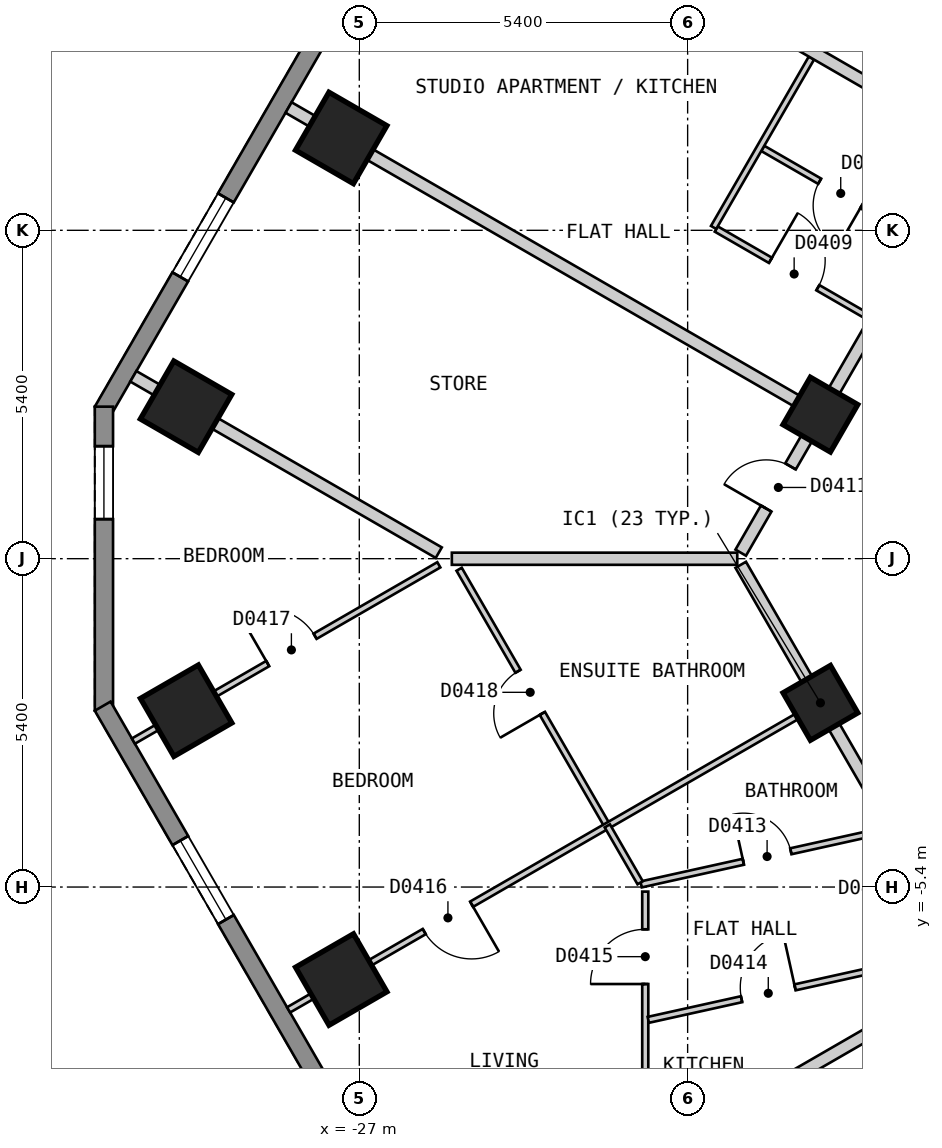
"""IFC4 building model, lengths in metres.
Left out: names, types, materials, properties, quantities, classifications, styles, units other than length and angle.
Written with IfcOpenShell. Run it as: python <this file> out.ifc"""

import sys

from ifc_helpers import new_model, si_unit, direction, frame, frame_2d, origin, origin_2d, place, context, subcontext, project, spatial, polyline, rectangle, outline, extrude, element, fill, save


model = new_model("IFC4")
c1 = context("Model", 3, precision=1e-05, world=origin(), true_north=direction((0.0, 1.0)))
c2 = subcontext(c1, "Body", "Model", "MODEL_VIEW")
j1 = project(units=[si_unit("LENGTHUNIT", "METRE"), si_unit("PLANEANGLEUNIT", "RADIAN")], contexts=[c1])
p1 = place(None, origin())
s1 = spatial("IfcSite", under=j1, at=p1, CompositionType="ELEMENT")
p2 = place(p1, origin())
s2 = spatial("IfcBuilding", under=s1, at=p2, CompositionType="ELEMENT")
p3 = place(p2, frame((0.0, 0.0, 38.4)))
s3 = spatial("IfcBuildingStorey", under=s2, at=p3, CompositionType="ELEMENT", Elevation=38.4)
for number, where, z_axis, x_axis in (
    (1, (-27.298, 6.919, 0.0), (0.0, 0.0, 1.0), (-0.5, -0.866, 0.0)),
    (2, (-29.849, 2.499, 0.0), (0.0, 0.0, 1.0), (-0.5, -0.866, 0.0)),
    (3, (-29.848, -2.5, 0.0), (0.0, 0.0, 1.0), (0.5, -0.866, 0.0)),
    (4, (-27.297, -6.921, 0.0), (0.0, 0.0, 1.0), (0.5, -0.866, 0.0)),
):
    element("IfcColumn", number, at=place(p3, frame(where, z_axis=z_axis, x_axis=x_axis)), inside=s3, PredefinedType="COLUMN", context=c2, shape_type="SweptSolid", body=[
        extrude(rectangle(XDim=1.1, YDim=1.1, at=origin_2d()), origin(), (0.0, 0.0, 1.0), 3.0),
    ])
for number, where, z_axis, x_axis in (
    (5, (-19.416, -2.371, 0.0), (0.0, 0.0, 1.0), (0.5, -0.866, 0.0)),
    (6, (-19.417, 2.369, 0.0), (0.0, 0.0, 1.0), (-0.5, -0.866, 0.0)),
):
    element("IfcColumn", number, at=place(p3, frame(where, z_axis=z_axis, x_axis=x_axis)), inside=s3, PredefinedType="COLUMN", context=c2, shape_type="SweptSolid", body=[
        extrude(rectangle(XDim=0.9, YDim=0.9, at=origin_2d()), origin(), (0.0, 0.0, 1.0), 3.0),
    ])
p4 = place(p3, frame((-17.71, 25.825, 0.0), z_axis=(0.0, 0.0, 1.0), x_axis=(-0.500001938803, -0.866024284413, 0.0)))
e7 = element("IfcWall", 7, at=p4, inside=s3, PredefinedType="SOLIDWALL", context=c2, shape_type="SweptSolid", body=[
    extrude(outline(polyline([(0.0, -0.15), (27.02, -0.15), (26.94, 0.15), (0.08, 0.15), (0.0, -0.15)])), origin(), (0.0, 0.0, 1.0), 2.7),
])
p5 = place(p4, frame((2.553, 0.0, 0.15)))
e8 = element("IfcOpeningElement", 8, at=p5, cuts=e7, PredefinedType="OPENING", context=c2, shape_type="SweptSolid", body=[
    extrude(rectangle(XDim=1.5, YDim=2.1, at=frame_2d((0.75, 1.05))), frame((0.0, 0.16, 0.0), z_axis=(0.0, -1.0, 0.0), x_axis=(1.0, 0.0, 0.0)), (0.0, 0.0, 1.0), 0.32),
])
p6 = place(p4, frame((7.658, 0.0, 0.15)))
e9 = element("IfcOpeningElement", 9, at=p6, cuts=e7, PredefinedType="OPENING", context=c2, shape_type="SweptSolid", body=[
    extrude(rectangle(XDim=1.5, YDim=2.1, at=frame_2d((0.75, 1.05))), frame((0.0, 0.16, 0.0), z_axis=(0.0, -1.0, 0.0), x_axis=(1.0, 0.0, 0.0)), (0.0, 0.0, 1.0), 0.32),
])
p7 = place(p4, frame((12.761, 0.0, 0.15)))
e10 = element("IfcOpeningElement", 10, at=p7, cuts=e7, PredefinedType="OPENING", context=c2, shape_type="SweptSolid", body=[
    extrude(rectangle(XDim=1.5, YDim=2.1, at=frame_2d((0.75, 1.05))), frame((0.0, 0.16, 0.0), z_axis=(0.0, -1.0, 0.0), x_axis=(1.0, 0.0, 0.0)), (0.0, 0.0, 1.0), 0.32),
])
p8 = place(p4, frame((17.865, 0.0, 0.15)))
e11 = element("IfcOpeningElement", 11, at=p8, cuts=e7, PredefinedType="OPENING", context=c2, shape_type="SweptSolid", body=[
    extrude(rectangle(XDim=1.5, YDim=2.1, at=frame_2d((0.75, 1.05))), frame((0.0, 0.16, 0.0), z_axis=(0.0, -1.0, 0.0), x_axis=(1.0, 0.0, 0.0)), (0.0, 0.0, 1.0), 0.32),
])
p9 = place(p4, frame((22.969, 0.0, 0.15)))
e12 = element("IfcOpeningElement", 12, at=p9, cuts=e7, PredefinedType="OPENING", context=c2, shape_type="SweptSolid", body=[
    extrude(rectangle(XDim=1.5, YDim=2.1, at=frame_2d((0.75, 1.05))), frame((0.0, 0.16, 0.0), z_axis=(0.0, -1.0, 0.0), x_axis=(1.0, 0.0, 0.0)), (0.0, 0.0, 1.0), 0.32),
])
p10 = place(p3, frame((-31.2, 2.5, 0.0), z_axis=(0.0, 0.0, 1.0), x_axis=(0.0, -1.0, 0.0)))
e13 = element("IfcWall", 13, at=p10, inside=s3, PredefinedType="SOLIDWALL", context=c2, shape_type="SweptSolid", body=[
    extrude(outline(polyline([(0.0, -0.15), (5.0, -0.15), (4.92, 0.15), (0.08, 0.15), (0.0, -0.15)])), origin(), (0.0, 0.0, 1.0), 2.7),
])
p11 = place(p10, frame((0.65, 0.0, 0.15)))
e14 = element("IfcOpeningElement", 14, at=p11, cuts=e13, PredefinedType="OPENING", context=c2, shape_type="SweptSolid", body=[
    extrude(rectangle(XDim=1.2, YDim=2.1, at=frame_2d((0.6, 1.05))), frame((0.0, 0.16, 0.0), z_axis=(0.0, -1.0, 0.0), x_axis=(1.0, 0.0, 0.0)), (0.0, 0.0, 1.0), 0.32),
])
p12 = place(p3, frame((-31.22, -2.425, 0.0), z_axis=(0.0, 0.0, 1.0), x_axis=(0.500001938803, -0.866024284413, 0.0)))
e15 = element("IfcWall", 15, at=p12, inside=s3, PredefinedType="SOLIDWALL", context=c2, shape_type="SweptSolid", body=[
    extrude(outline(polyline([(0.0, -0.15), (27.02, -0.15), (26.94, 0.15), (0.08, 0.15), (0.0, -0.15)])), origin(), (0.0, 0.0, 1.0), 2.7),
])
p13 = place(p12, frame((2.553, 0.0, 0.15)))
e16 = element("IfcOpeningElement", 16, at=p13, cuts=e15, PredefinedType="OPENING", context=c2, shape_type="SweptSolid", body=[
    extrude(rectangle(XDim=1.5, YDim=2.1, at=frame_2d((0.75, 1.05))), frame((0.0, 0.16, 0.0), z_axis=(0.0, -1.0, 0.0), x_axis=(1.0, 0.0, 0.0)), (0.0, 0.0, 1.0), 0.32),
])
p14 = place(p12, frame((7.657, 0.0, 0.15)))
e17 = element("IfcOpeningElement", 17, at=p14, cuts=e15, PredefinedType="OPENING", context=c2, shape_type="SweptSolid", body=[
    extrude(rectangle(XDim=1.5, YDim=2.1, at=frame_2d((0.75, 1.05))), frame((0.0, 0.16, 0.0), z_axis=(0.0, -1.0, 0.0), x_axis=(1.0, 0.0, 0.0)), (0.0, 0.0, 1.0), 0.32),
])
p15 = place(p12, frame((12.761, 0.0, 0.15)))
e18 = element("IfcOpeningElement", 18, at=p15, cuts=e15, PredefinedType="OPENING", context=c2, shape_type="SweptSolid", body=[
    extrude(rectangle(XDim=1.5, YDim=2.1, at=frame_2d((0.75, 1.05))), frame((0.0, 0.16, 0.0), z_axis=(0.0, -1.0, 0.0), x_axis=(1.0, 0.0, 0.0)), (0.0, 0.0, 1.0), 0.32),
])
p16 = place(p12, frame((17.865, 0.0, 0.15)))
e19 = element("IfcOpeningElement", 19, at=p16, cuts=e15, PredefinedType="OPENING", context=c2, shape_type="SweptSolid", body=[
    extrude(rectangle(XDim=1.5, YDim=2.1, at=frame_2d((0.75, 1.05))), frame((0.0, 0.16, 0.0), z_axis=(0.0, -1.0, 0.0), x_axis=(1.0, 0.0, 0.0)), (0.0, 0.0, 1.0), 0.32),
])
p17 = place(p12, frame((22.969, 0.0, 0.15)))
e20 = element("IfcOpeningElement", 20, at=p17, cuts=e15, PredefinedType="OPENING", context=c2, shape_type="SweptSolid", body=[
    extrude(rectangle(XDim=1.5, YDim=2.1, at=frame_2d((0.75, 1.05))), frame((0.0, 0.16, 0.0), z_axis=(0.0, -1.0, 0.0), x_axis=(1.0, 0.0, 0.0)), (0.0, 0.0, 1.0), 0.32),
])
p18 = place(p3, frame((-20.727, -0.101, 0.0), z_axis=(0.0, 0.0, 1.0), x_axis=(0.500049702773, -0.865996705973, 0.0)))
e21 = element("IfcWall", 21, at=p18, inside=s3, PredefinedType="PARTITIONING", context=c2, shape_type="SweptSolid", body=[
    extrude(rectangle(XDim=7.211, YDim=0.2, at=frame_2d((3.605, 0.0))), origin(), (0.0, 0.0, 1.0), 2.7),
])
p19 = place(p18, frame((5.654, 0.0, 0.0)))
e22 = element("IfcOpeningElement", 22, at=p19, cuts=e21, PredefinedType="OPENING", context=c2, shape_type="SweptSolid", body=[
    extrude(rectangle(XDim=1.0, YDim=2.1, at=frame_2d((0.5, 1.05))), frame((0.0, 0.11, 0.0), z_axis=(0.0, -1.0, 0.0), x_axis=(1.0, 0.0, 0.0)), (0.0, 0.0, 1.0), 0.22),
])
p20 = place(p3, frame((-20.727, 0.099, 0.0), z_axis=(0.0, 0.0, 1.0), x_axis=(0.499993204491, 0.866029327138, 0.0)))
e23 = element("IfcWall", 23, at=p20, inside=s3, PredefinedType="PARTITIONING", context=c2, shape_type="SweptSolid", body=[
    extrude(rectangle(XDim=20.554, YDim=0.2, at=frame_2d((10.277, 0.0))), origin(), (0.0, 0.0, 1.0), 2.7),
])
p21 = place(p20, frame((18.916, 0.0, 0.0)))
e24 = element("IfcOpeningElement", 24, at=p21, cuts=e23, PredefinedType="OPENING", context=c2, shape_type="SweptSolid", body=[
    extrude(rectangle(XDim=0.8, YDim=2.1, at=frame_2d((0.4, 1.05))), frame((0.0, 0.11, 0.0), z_axis=(0.0, -1.0, 0.0), x_axis=(1.0, 0.0, 0.0)), (0.0, 0.0, 1.0), 0.22),
])
p22 = place(p20, frame((14.88, 0.0, 0.0)))
e25 = element("IfcOpeningElement", 25, at=p22, cuts=e23, PredefinedType="OPENING", context=c2, shape_type="SweptSolid", body=[
    extrude(rectangle(XDim=1.0, YDim=2.1, at=frame_2d((0.5, 1.05))), frame((0.0, 0.11, 0.0), z_axis=(0.0, -1.0, 0.0), x_axis=(1.0, 0.0, 0.0)), (0.0, 0.0, 1.0), 0.22),
])
p23 = place(p20, frame((9.776, 0.0, 0.0)))
e26 = element("IfcOpeningElement", 26, at=p23, cuts=e23, PredefinedType="OPENING", context=c2, shape_type="SweptSolid", body=[
    extrude(rectangle(XDim=1.0, YDim=2.1, at=frame_2d((0.5, 1.05))), frame((0.0, 0.11, 0.0), z_axis=(0.0, -1.0, 0.0), x_axis=(1.0, 0.0, 0.0)), (0.0, 0.0, 1.0), 0.22),
])
p24 = place(p20, frame((4.673, 0.0, 0.0)))
e27 = element("IfcOpeningElement", 27, at=p24, cuts=e23, PredefinedType="OPENING", context=c2, shape_type="SweptSolid", body=[
    extrude(rectangle(XDim=1.0, YDim=2.1, at=frame_2d((0.5, 1.05))), frame((0.0, 0.11, 0.0), z_axis=(0.0, -1.0, 0.0), x_axis=(1.0, 0.0, 0.0)), (0.0, 0.0, 1.0), 0.22),
])
p25 = place(p20, frame((0.838, 0.0, 0.0)))
e28 = element("IfcOpeningElement", 28, at=p25, cuts=e23, PredefinedType="OPENING", context=c2, shape_type="SweptSolid", body=[
    extrude(rectangle(XDim=0.8, YDim=2.1, at=frame_2d((0.4, 1.05))), frame((0.0, 0.11, 0.0), z_axis=(0.0, -1.0, 0.0), x_axis=(1.0, 0.0, 0.0)), (0.0, 0.0, 1.0), 0.22),
])
p26 = place(p3, frame((-25.358, -0.174, 0.0), z_axis=(0.0, 0.0, 1.0), x_axis=(0.500093956194, -0.865971151354, 0.0)))
e29 = element("IfcWall", 29, at=p26, inside=s3, PredefinedType="PARTITIONING", context=c2, shape_type="SweptSolid", body=[
    extrude(rectangle(XDim=4.873, YDim=0.1, at=frame_2d((2.437, 0.0))), origin(), (0.0, 0.0, 1.0), 2.7),
])
p27 = place(p26, frame((1.937, 0.0, 0.0)))
e30 = element("IfcOpeningElement", 30, at=p27, cuts=e29, PredefinedType="OPENING", context=c2, shape_type="SweptSolid", body=[
    extrude(rectangle(XDim=0.8, YDim=2.1, at=frame_2d((0.4, 1.05))), frame((0.0, 0.06, 0.0), z_axis=(0.0, -1.0, 0.0), x_axis=(1.0, 0.0, 0.0)), (0.0, 0.0, 1.0), 0.12),
])
p28 = place(p3, frame((-20.364, 6.747, 0.0), z_axis=(0.0, 0.0, 1.0), x_axis=(0.866003949776, -0.500037157592, 0.0)))
e31 = element("IfcWall", 31, at=p28, inside=s3, PredefinedType="PARTITIONING", context=c2, shape_type="SweptSolid", body=[
    extrude(rectangle(XDim=2.91, YDim=0.1, at=frame_2d((1.455, 0.0))), origin(), (0.0, 0.0, 1.0), 2.7),
])
p29 = place(p28, frame((1.08, 0.0, 0.0)))
e32 = element("IfcOpeningElement", 32, at=p29, cuts=e31, PredefinedType="OPENING", context=c2, shape_type="SweptSolid", body=[
    extrude(rectangle(XDim=0.8, YDim=2.1, at=frame_2d((0.4, 1.05))), frame((0.0, 0.06, 0.0), z_axis=(0.0, -1.0, 0.0), x_axis=(1.0, 0.0, 0.0)), (0.0, 0.0, 1.0), 0.12),
])
p30 = place(p3, frame((-21.129, 5.421, 0.0), z_axis=(0.0, 0.0, 1.0), x_axis=(0.865935355752, -0.500155935342, 0.0)))
e33 = element("IfcWall", 33, at=p30, inside=s3, PredefinedType="PARTITIONING", context=c2, shape_type="SweptSolid", body=[
    extrude(rectangle(XDim=2.909, YDim=0.1, at=frame_2d((1.454, 0.0))), origin(), (0.0, 0.0, 1.0), 2.7),
])
p31 = place(p30, frame((1.029, 0.0, 0.0)))
e34 = element("IfcOpeningElement", 34, at=p31, cuts=e33, PredefinedType="OPENING", context=c2, shape_type="SweptSolid", body=[
    extrude(rectangle(XDim=0.9, YDim=2.1, at=frame_2d((0.45, 1.05))), frame((0.0, 0.06, 0.0), z_axis=(0.0, -1.0, 0.0), x_axis=(1.0, 0.0, 0.0)), (0.0, 0.0, 1.0), 0.12),
])
p32 = place(p3, frame((-21.173, 5.447, 0.0), z_axis=(0.0, 0.0, 1.0), x_axis=(0.500162542782, 0.865931539325, 0.0)))
e35 = element("IfcWall", 35, at=p32, inside=s3, PredefinedType="PARTITIONING", context=c2, shape_type="SweptSolid", body=[
    extrude(rectangle(XDim=3.217, YDim=0.1, at=frame_2d((1.609, 0.0))), origin(), (0.0, 0.0, 1.0), 2.7),
])
p33 = place(p3, frame((-22.297, -9.813, 0.0), z_axis=(0.0, 0.0, 1.0), x_axis=(0.0, 1.0, 0.0)))
e36 = element("IfcWall", 36, at=p33, inside=s3, PredefinedType="PARTITIONING", context=c2, shape_type="SweptSolid", body=[
    extrude(rectangle(XDim=4.338, YDim=0.1, at=frame_2d((2.169, 0.0))), origin(), (0.0, 0.0, 1.0), 2.7),
])
p34 = place(p33, frame((2.818, 0.0, 0.0)))
e37 = element("IfcOpeningElement", 37, at=p34, cuts=e36, PredefinedType="OPENING", context=c2, shape_type="SweptSolid", body=[
    extrude(rectangle(XDim=0.9, YDim=2.1, at=frame_2d((0.45, 1.05))), frame((0.0, 0.06, 0.0), z_axis=(0.0, -1.0, 0.0), x_axis=(1.0, 0.0, 0.0)), (0.0, 0.0, 1.0), 0.12),
])
p35 = place(p3, frame((-22.365, -5.357, 0.0), z_axis=(0.0, 0.0, 1.0), x_axis=(0.976339488582, 0.216243388421, 0.0)))
e38 = element("IfcWall", 38, at=p35, inside=s3, PredefinedType="PARTITIONING", context=c2, shape_type="SweptSolid", body=[
    extrude(rectangle(XDim=4.139, YDim=0.1, at=frame_2d((2.069, 0.0))), origin(), (0.0, 0.0, 1.0), 2.7),
])
p36 = place(p35, frame((1.722, 0.0, 0.0)))
e39 = element("IfcOpeningElement", 39, at=p36, cuts=e38, PredefinedType="OPENING", context=c2, shape_type="SweptSolid", body=[
    extrude(rectangle(XDim=0.8, YDim=2.1, at=frame_2d((0.4, 1.05))), frame((0.0, 0.06, 0.0), z_axis=(0.0, -1.0, 0.0), x_axis=(1.0, 0.0, 0.0)), (0.0, 0.0, 1.0), 0.12),
])
p37 = place(p3, frame((-22.247, -7.584, 0.0), z_axis=(0.0, 0.0, 1.0), x_axis=(0.97635375062, 0.216178985219, 0.0)))
e40 = element("IfcWall", 40, at=p37, inside=s3, PredefinedType="PARTITIONING", context=c2, shape_type="SweptSolid", body=[
    extrude(rectangle(XDim=4.094, YDim=0.1, at=frame_2d((2.047, 0.0))), origin(), (0.0, 0.0, 1.0), 2.7),
])
p38 = place(p37, frame((1.571, 0.0, 0.0)))
e41 = element("IfcOpeningElement", 41, at=p38, cuts=e40, PredefinedType="OPENING", context=c2, shape_type="SweptSolid", body=[
    extrude(rectangle(XDim=0.9, YDim=2.1, at=frame_2d((0.45, 1.05))), frame((0.0, 0.06, 0.0), z_axis=(0.0, -1.0, 0.0), x_axis=(1.0, 0.0, 0.0)), (0.0, 0.0, 1.0), 0.12),
])
p39 = place(p3, frame((-28.163, -7.42, 0.0), z_axis=(0.0, 0.0, 1.0), x_axis=(0.866065245018, 0.499930986609, 0.0)))
e42 = element("IfcWall", 42, at=p39, inside=s3, PredefinedType="PARTITIONING", context=c2, shape_type="SweptSolid", body=[
    extrude(rectangle(XDim=10.0, YDim=0.1, at=frame_2d((5.0, 0.0))), origin(), (0.0, 0.0, 1.0), 2.7),
])
p40 = place(p39, frame((2.576, 0.0, 0.0)))
e43 = element("IfcOpeningElement", 43, at=p40, cuts=e42, PredefinedType="OPENING", context=c2, shape_type="SweptSolid", body=[
    extrude(rectangle(XDim=0.9, YDim=2.1, at=frame_2d((0.45, 1.05))), frame((0.0, 0.06, 0.0), z_axis=(0.0, -1.0, 0.0), x_axis=(1.0, 0.0, 0.0)), (0.0, 0.0, 1.0), 0.12),
])
p41 = place(p3, frame((-30.715, -3.0, 0.0), z_axis=(0.0, 0.0, 1.0), x_axis=(0.866116197112, 0.49984270836, 0.0)))
e44 = element("IfcWall", 44, at=p41, inside=s3, PredefinedType="PARTITIONING", context=c2, shape_type="SweptSolid", body=[
    extrude(rectangle(XDim=5.8, YDim=0.1, at=frame_2d((2.9, 0.0))), origin(), (0.0, 0.0, 1.0), 2.7),
])
p42 = place(p41, frame((2.55, 0.0, 0.0)))
e45 = element("IfcOpeningElement", 45, at=p42, cuts=e44, PredefinedType="OPENING", context=c2, shape_type="SweptSolid", body=[
    extrude(rectangle(XDim=0.9, YDim=2.1, at=frame_2d((0.45, 1.05))), frame((0.0, 0.06, 0.0), z_axis=(0.0, -1.0, 0.0), x_axis=(1.0, 0.0, 0.0)), (0.0, 0.0, 1.0), 0.12),
])
p43 = place(p3, frame((-28.163, 7.419, 0.0), z_axis=(0.0, 0.0, 1.0), x_axis=(0.866022959057, -0.500004234368, 0.0)))
e46 = element("IfcWall", 46, at=p43, inside=s3, PredefinedType="PARTITIONING", context=c2, shape_type="SweptSolid", body=[
    extrude(rectangle(XDim=10.0, YDim=0.2, at=frame_2d((5.0, 0.0))), origin(), (0.0, 0.0, 1.0), 2.7),
])
p44 = place(p3, frame((-30.716, 2.999, 0.0), z_axis=(0.0, 0.0, 1.0), x_axis=(0.866032775405, -0.499987231761, 0.0)))
e47 = element("IfcWall", 47, at=p44, inside=s3, PredefinedType="PARTITIONING", context=c2, shape_type="SweptSolid", body=[
    extrude(rectangle(XDim=5.8, YDim=0.2, at=frame_2d((2.9, 0.0))), origin(), (0.0, 0.0, 1.0), 2.7),
])
p45 = place(p3, frame((-25.611, 11.839, 0.0), z_axis=(0.0, 0.0, 1.0), x_axis=(0.866022959057, -0.500004234368, 0.0)))
e48 = element("IfcWall", 48, at=p45, inside=s3, PredefinedType="PARTITIONING", context=c2, shape_type="SweptSolid", body=[
    extrude(rectangle(XDim=10.0, YDim=0.2, at=frame_2d((5.0, 0.0))), origin(), (0.0, 0.0, 1.0), 2.7),
])
p46 = place(p3, frame((-25.478, -0.001, 0.0), z_axis=(0.0, 0.0, 1.0), x_axis=(1.0, 0.0, 0.0)))
e49 = element("IfcWall", 49, at=p46, inside=s3, PredefinedType="PARTITIONING", context=c2, shape_type="SweptSolid", body=[
    extrude(rectangle(XDim=4.694, YDim=0.2, at=frame_2d((2.347, 0.0))), origin(), (0.0, 0.0, 1.0), 2.7),
])
p47 = place(p3, frame((-25.61, -11.841, 0.0), z_axis=(0.0, 0.0, 1.0), x_axis=(0.866019023803, 0.500011050288, 0.0)))
e50 = element("IfcWall", 50, at=p47, inside=s3, PredefinedType="PARTITIONING", context=c2, shape_type="SweptSolid", body=[
    extrude(rectangle(XDim=8.47, YDim=0.2, at=frame_2d((4.235, 0.0))), origin(), (0.0, 0.0, 1.0), 2.7),
])
p48 = place(p3, frame((-22.921, -4.394, 0.0), z_axis=(0.0, 0.0, 1.0), x_axis=(0.499565963512, -0.866275849889, 0.0)))
e51 = element("IfcWall", 51, at=p48, inside=s3, PredefinedType="PARTITIONING", context=c2, shape_type="SweptSolid", body=[
    extrude(rectangle(XDim=1.081, YDim=0.1, at=frame_2d((0.54, 0.0))), origin(), (0.0, 0.0, 1.0), 2.7),
])
p49 = place(p9, origin())
e52 = element("IfcWindow", 52, at=p49, inside=s3, PartitioningType="SINGLE_PANEL", PredefinedType="WINDOW", context=c2, shape_type="SweptSolid", body=[
    extrude(rectangle(XDim=1.5, YDim=2.1, at=frame_2d((0.75, 1.05))), frame((0.0, 0.03, 0.0), z_axis=(0.0, -1.0, 0.0), x_axis=(1.0, 0.0, 0.0)), (0.0, 0.0, 1.0), 0.06),
])
fill(e12, e52)
p50 = place(p11, origin())
e53 = element("IfcWindow", 53, at=p50, inside=s3, PartitioningType="SINGLE_PANEL", PredefinedType="WINDOW", context=c2, shape_type="SweptSolid", body=[
    extrude(rectangle(XDim=1.2, YDim=2.1, at=frame_2d((0.6, 1.05))), frame((0.0, 0.03, 0.0), z_axis=(0.0, -1.0, 0.0), x_axis=(1.0, 0.0, 0.0)), (0.0, 0.0, 1.0), 0.06),
])
fill(e14, e53)
p51 = place(p13, origin())
e54 = element("IfcWindow", 54, at=p51, inside=s3, PartitioningType="SINGLE_PANEL", PredefinedType="WINDOW", context=c2, shape_type="SweptSolid", body=[
    extrude(rectangle(XDim=1.5, YDim=2.1, at=frame_2d((0.75, 1.05))), frame((0.0, 0.03, 0.0), z_axis=(0.0, -1.0, 0.0), x_axis=(1.0, 0.0, 0.0)), (0.0, 0.0, 1.0), 0.06),
])
fill(e16, e54)
p52 = place(p31, origin())
e55 = element("IfcDoor", 55, at=p52, inside=s3, OperationType="SINGLE_SWING_LEFT", PredefinedType="DOOR", context=c2, shape_type="SweptSolid", body=[
    extrude(rectangle(XDim=0.9, YDim=2.1, at=frame_2d((0.45, 1.05))), frame((0.0, 0.025, 0.0), z_axis=(0.0, -1.0, 0.0), x_axis=(1.0, 0.0, 0.0)), (0.0, 0.0, 1.0), 0.05),
])
fill(e34, e55)
p53 = place(p29, origin())
e56 = element("IfcDoor", 56, at=p53, inside=s3, OperationType="SINGLE_SWING_RIGHT", PredefinedType="DOOR", context=c2, shape_type="SweptSolid", body=[
    extrude(rectangle(XDim=0.8, YDim=2.1, at=frame_2d((0.4, 1.05))), frame((0.0, 0.025, 0.0), z_axis=(0.0, -1.0, 0.0), x_axis=(1.0, 0.0, 0.0)), (0.0, 0.0, 1.0), 0.05),
])
fill(e32, e56)
p54 = place(p25, origin())
e57 = element("IfcDoor", 57, at=p54, inside=s3, OperationType="SINGLE_SWING_LEFT", PredefinedType="DOOR", context=c2, shape_type="SweptSolid", body=[
    extrude(rectangle(XDim=0.8, YDim=2.1, at=frame_2d((0.4, 1.05))), frame((0.0, 0.025, 0.0), z_axis=(0.0, -1.0, 0.0), x_axis=(1.0, 0.0, 0.0)), (0.0, 0.0, 1.0), 0.05),
])
fill(e28, e57)
p55 = place(p36, origin())
e58 = element("IfcDoor", 58, at=p55, inside=s3, OperationType="SINGLE_SWING_LEFT", PredefinedType="DOOR", context=c2, shape_type="SweptSolid", body=[
    extrude(rectangle(XDim=0.8, YDim=2.1, at=frame_2d((0.4, 1.05))), frame((0.0, 0.025, 0.0), z_axis=(0.0, -1.0, 0.0), x_axis=(1.0, 0.0, 0.0)), (0.0, 0.0, 1.0), 0.05),
])
fill(e39, e58)
p56 = place(p38, origin())
e59 = element("IfcDoor", 59, at=p56, inside=s3, OperationType="SINGLE_SWING_RIGHT", PredefinedType="DOOR", context=c2, shape_type="SweptSolid", body=[
    extrude(rectangle(XDim=0.9, YDim=2.1, at=frame_2d((0.45, 1.05))), frame((0.0, 0.025, 0.0), z_axis=(0.0, -1.0, 0.0), x_axis=(1.0, 0.0, 0.0)), (0.0, 0.0, 1.0), 0.05),
])
fill(e41, e59)
p57 = place(p34, origin())
e60 = element("IfcDoor", 60, at=p57, inside=s3, OperationType="SINGLE_SWING_LEFT", PredefinedType="DOOR", context=c2, shape_type="SweptSolid", body=[
    extrude(rectangle(XDim=0.9, YDim=2.1, at=frame_2d((0.45, 1.05))), frame((0.0, 0.025, 0.0), z_axis=(0.0, -1.0, 0.0), x_axis=(1.0, 0.0, 0.0)), (0.0, 0.0, 1.0), 0.05),
])
fill(e37, e60)
p58 = place(p40, origin())
e61 = element("IfcDoor", 61, at=p58, inside=s3, OperationType="SINGLE_SWING_RIGHT", PredefinedType="DOOR", context=c2, shape_type="SweptSolid", body=[
    extrude(rectangle(XDim=0.9, YDim=2.1, at=frame_2d((0.45, 1.05))), frame((0.0, 0.025, 0.0), z_axis=(0.0, -1.0, 0.0), x_axis=(1.0, 0.0, 0.0)), (0.0, 0.0, 1.0), 0.05),
])
fill(e43, e61)
p59 = place(p42, origin())
e62 = element("IfcDoor", 62, at=p59, inside=s3, OperationType="SINGLE_SWING_LEFT", PredefinedType="DOOR", context=c2, shape_type="SweptSolid", body=[
    extrude(rectangle(XDim=0.9, YDim=2.1, at=frame_2d((0.45, 1.05))), frame((0.0, 0.025, 0.0), z_axis=(0.0, -1.0, 0.0), x_axis=(1.0, 0.0, 0.0)), (0.0, 0.0, 1.0), 0.05),
])
fill(e45, e62)
p60 = place(p27, origin())
e63 = element("IfcDoor", 63, at=p60, inside=s3, OperationType="SINGLE_SWING_RIGHT", PredefinedType="DOOR", context=c2, shape_type="SweptSolid", body=[
    extrude(rectangle(XDim=0.8, YDim=2.1, at=frame_2d((0.4, 1.05))), frame((0.0, 0.025, 0.0), z_axis=(0.0, -1.0, 0.0), x_axis=(1.0, 0.0, 0.0)), (0.0, 0.0, 1.0), 0.05),
])
fill(e30, e63)
save(model, sys.argv[1])
